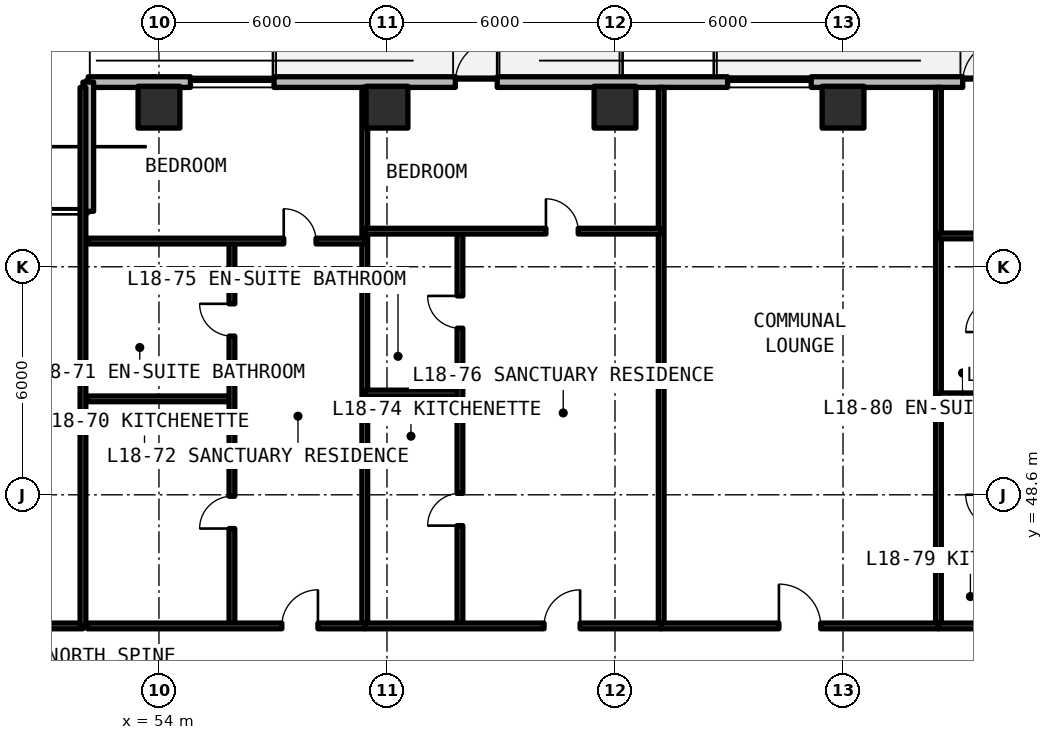
"""IFC4 building model, lengths in metres.
Left out: names, types, materials, properties, quantities, classifications, styles, units other than length and angle.
Written with IfcOpenShell. Run it as: python <this file> out.ifc"""

import sys

from ifc_helpers import new_model, si_unit, direction, frame, frame_2d, origin, origin_2d, place, context, subcontext, project, spatial, rectangle, extrude, element, fill, save


model = new_model("IFC4")
c1 = context("Model", 3, precision=1e-05, world=origin(), true_north=direction((0.0, 1.0)))
c2 = subcontext(c1, "Body", "Model", "MODEL_VIEW")
j1 = project(units=[si_unit("LENGTHUNIT", "METRE"), si_unit("PLANEANGLEUNIT", "RADIAN")], contexts=[c1])
p1 = place(None, origin())
s1 = spatial("IfcSite", under=j1, at=p1, CompositionType="ELEMENT")
p2 = place(p1, origin())
s2 = spatial("IfcBuilding", under=s1, at=p2, CompositionType="ELEMENT")
p3 = place(p2, frame((0.0, 0.0, 66.0)))
s3 = spatial("IfcBuildingStorey", under=s2, at=p3, CompositionType="ELEMENT", Elevation=66.0)
for number, where, z_axis, x_axis in (
    (1, (54.0, 58.8, 0.0), (0.0, 0.0, 1.0), (1.0, 0.0, 0.0)),
    (2, (60.0, 58.8, 0.0), (0.0, 0.0, 1.0), (1.0, 0.0, 0.0)),
    (3, (66.0, 58.8, 0.0), (0.0, 0.0, 1.0), (1.0, 0.0, 0.0)),
    (4, (72.0, 58.8, 0.0), (0.0, 0.0, 1.0), (1.0, 0.0, 0.0)),
):
    element("IfcColumn", number, at=place(p3, frame(where, z_axis=z_axis, x_axis=x_axis)), inside=s3, PredefinedType="COLUMN", context=c2, shape_type="SweptSolid", body=[
        extrude(rectangle(XDim=1.1, YDim=1.1, at=origin_2d()), origin(), (0.0, 0.0, 1.0), 3.63),
    ])
p4 = place(p3, frame((96.542, 59.46, 0.0), z_axis=(0.0, 0.0, 1.0), x_axis=(-1.0, 0.0, 0.0)))
e5 = element("IfcWall", 5, at=p4, inside=s3, PredefinedType="SOLIDWALL", context=c2, shape_type="SweptSolid", body=[
    extrude(rectangle(XDim=44.402, YDim=0.28, at=frame_2d((22.201, 0.0))), origin(), (0.0, 0.0, 1.0), 3.41),
])
p5 = place(p4, frame((33.642, 0.0, 0.0)))
e6 = element("IfcOpeningElement", 6, at=p5, cuts=e5, PredefinedType="OPENING", context=c2, shape_type="SweptSolid", body=[
    extrude(rectangle(XDim=1.1, YDim=2.15, at=frame_2d((0.55, 1.075))), frame((0.0, 0.15, 0.0), z_axis=(0.0, -1.0, 0.0), x_axis=(1.0, 0.0, 0.0)), (0.0, 0.0, 1.0), 0.3),
])
p6 = place(p4, frame((20.292, 0.0, 0.0)))
e7 = element("IfcOpeningElement", 7, at=p6, cuts=e5, PredefinedType="OPENING", context=c2, shape_type="SweptSolid", body=[
    extrude(rectangle(XDim=1.1, YDim=2.15, at=frame_2d((0.55, 1.075))), frame((0.0, 0.15, 0.0), z_axis=(0.0, -1.0, 0.0), x_axis=(1.0, 0.0, 0.0)), (0.0, 0.0, 1.0), 0.3),
])
p7 = place(p4, frame((9.692, 0.0, 0.0)))
e8 = element("IfcOpeningElement", 8, at=p7, cuts=e5, PredefinedType="OPENING", context=c2, shape_type="SweptSolid", body=[
    extrude(rectangle(XDim=1.1, YDim=2.15, at=frame_2d((0.55, 1.075))), frame((0.0, 0.15, 0.0), z_axis=(0.0, -1.0, 0.0), x_axis=(1.0, 0.0, 0.0)), (0.0, 0.0, 1.0), 0.3),
])
p8 = place(p4, frame((39.514, 0.0, 0.78)))
e9 = element("IfcOpeningElement", 9, at=p8, cuts=e5, PredefinedType="OPENING", context=c2, shape_type="SweptSolid", body=[
    extrude(rectangle(XDim=2.2, YDim=1.66, at=frame_2d((1.1, 0.83))), frame((0.0, 0.15, 0.0), z_axis=(0.0, -1.0, 0.0), x_axis=(1.0, 0.0, 0.0)), (0.0, 0.0, 1.0), 0.3),
])
p9 = place(p4, frame((25.379, 0.0, 0.78)))
e10 = element("IfcOpeningElement", 10, at=p9, cuts=e5, PredefinedType="OPENING", context=c2, shape_type="SweptSolid", body=[
    extrude(rectangle(XDim=2.2, YDim=1.66, at=frame_2d((1.1, 0.83))), frame((0.0, 0.15, 0.0), z_axis=(0.0, -1.0, 0.0), x_axis=(1.0, 0.0, 0.0)), (0.0, 0.0, 1.0), 0.3),
])
p10 = place(p4, frame((2.564, 0.0, 0.78)))
e11 = element("IfcOpeningElement", 11, at=p10, cuts=e5, PredefinedType="OPENING", context=c2, shape_type="SweptSolid", body=[
    extrude(rectangle(XDim=2.2, YDim=1.66, at=frame_2d((1.1, 0.83))), frame((0.0, 0.15, 0.0), z_axis=(0.0, -1.0, 0.0), x_axis=(1.0, 0.0, 0.0)), (0.0, 0.0, 1.0), 0.3),
])
p11 = place(p3, frame((52.14, 59.46, 0.0), z_axis=(0.0, 0.0, 1.0), x_axis=(0.0, -1.0, 0.0)))
e12 = element("IfcWall", 12, at=p11, inside=s3, PredefinedType="SOLIDWALL", context=c2, shape_type="SweptSolid", body=[
    extrude(rectangle(XDim=3.4, YDim=0.28, at=frame_2d((1.7, 0.0))), origin(), (0.0, 0.0, 1.0), 3.41),
])
p12 = place(p3, frame((43.6, 45.15, 0.0), z_axis=(0.0, 0.0, 1.0), x_axis=(1.0, 0.0, 0.0)))
e13 = element("IfcWall", 13, at=p12, inside=s3, PredefinedType="SOLIDWALL", context=c2, shape_type="SweptSolid", body=[
    extrude(rectangle(XDim=8.4, YDim=0.15, at=frame_2d((4.2, 0.0))), origin(), (0.0, 0.0, 1.0), 2.63),
])
p13 = place(p12, frame((3.65, 0.0, 0.0)))
e14 = element("IfcOpeningElement", 14, at=p13, cuts=e13, PredefinedType="OPENING", context=c2, shape_type="SweptSolid", body=[
    extrude(rectangle(XDim=1.1, YDim=2.15, at=frame_2d((0.55, 1.075))), frame((0.0, 0.085, 0.0), z_axis=(0.0, -1.0, 0.0), x_axis=(1.0, 0.0, 0.0)), (0.0, 0.0, 1.0), 0.17),
])
for number, where, z_axis, x_axis in (
    (15, (52.0, 45.15, 0.0), (0.0, 0.0, 1.0), (0.0, 1.0, 0.0)),
    (16, (59.416, 45.15, 0.0), (0.0, 0.0, 1.0), (0.0, 1.0, 0.0)),
):
    element("IfcWall", number, at=place(p3, frame(where, z_axis=z_axis, x_axis=x_axis)), inside=s3, PredefinedType="SOLIDWALL", context=c2, shape_type="SweptSolid", body=[
        extrude(rectangle(XDim=14.17, YDim=0.15, at=frame_2d((7.085, 0.0))), origin(), (0.0, 0.0, 1.0), 2.63),
    ])
p14 = place(p3, frame((52.12, 51.125, 0.0), z_axis=(0.0, 0.0, 1.0), x_axis=(1.0, 0.0, 0.0)))
e17 = element("IfcWall", 17, at=p14, inside=s3, PredefinedType="PARTITIONING", context=c2, shape_type="SweptSolid", body=[
    extrude(rectangle(XDim=3.8, YDim=0.15, at=frame_2d((1.9, 0.0))), origin(), (0.0, 0.0, 1.0), 2.63),
])
p15 = place(p3, frame((55.92, 45.15, 0.0), z_axis=(0.0, 0.0, 1.0), x_axis=(0.0, 1.0, 0.0)))
e18 = element("IfcWall", 18, at=p15, inside=s3, PredefinedType="PARTITIONING", context=c2, shape_type="SweptSolid", body=[
    extrude(rectangle(XDim=10.127, YDim=0.15, at=frame_2d((5.063, 0.0))), origin(), (0.0, 0.0, 1.0), 2.63),
])
p16 = place(p15, frame((2.562, 0.0, 0.0)))
e19 = element("IfcOpeningElement", 19, at=p16, cuts=e18, PredefinedType="OPENING", context=c2, shape_type="SweptSolid", body=[
    extrude(rectangle(XDim=0.85, YDim=2.1, at=frame_2d((0.425, 1.05))), frame((0.0, 0.085, 0.0), z_axis=(0.0, -1.0, 0.0), x_axis=(1.0, 0.0, 0.0)), (0.0, 0.0, 1.0), 0.17),
])
p17 = place(p15, frame((7.626, 0.0, 0.0)))
e20 = element("IfcOpeningElement", 20, at=p17, cuts=e18, PredefinedType="OPENING", context=c2, shape_type="SweptSolid", body=[
    extrude(rectangle(XDim=0.85, YDim=2.1, at=frame_2d((0.425, 1.05))), frame((0.0, 0.085, 0.0), z_axis=(0.0, -1.0, 0.0), x_axis=(1.0, 0.0, 0.0)), (0.0, 0.0, 1.0), 0.17),
])
p18 = place(p3, frame((52.12, 55.277, 0.0), z_axis=(0.0, 0.0, 1.0), x_axis=(1.0, 0.0, 0.0)))
e21 = element("IfcWall", 21, at=p18, inside=s3, PredefinedType="PARTITIONING", context=c2, shape_type="SweptSolid", body=[
    extrude(rectangle(XDim=7.296, YDim=0.15, at=frame_2d((3.648, 0.0))), origin(), (0.0, 0.0, 1.0), 2.63),
])
p19 = place(p18, frame((5.163, 0.0, 0.0)))
e22 = element("IfcOpeningElement", 22, at=p19, cuts=e21, PredefinedType="OPENING", context=c2, shape_type="SweptSolid", body=[
    extrude(rectangle(XDim=0.85, YDim=2.1, at=frame_2d((0.425, 1.05))), frame((0.0, 0.085, 0.0), z_axis=(0.0, -1.0, 0.0), x_axis=(1.0, 0.0, 0.0)), (0.0, 0.0, 1.0), 0.17),
])
p20 = place(p3, frame((52.12, 45.15, 0.0), z_axis=(0.0, 0.0, 1.0), x_axis=(1.0, 0.0, 0.0)))
e23 = element("IfcWall", 23, at=p20, inside=s3, PredefinedType="SOLIDWALL", context=c2, shape_type="SweptSolid", body=[
    extrude(rectangle(XDim=7.296, YDim=0.15, at=frame_2d((3.648, 0.0))), origin(), (0.0, 0.0, 1.0), 2.63),
])
p21 = place(p20, frame((5.113, 0.0, 0.0)))
e24 = element("IfcOpeningElement", 24, at=p21, cuts=e23, PredefinedType="OPENING", context=c2, shape_type="SweptSolid", body=[
    extrude(rectangle(XDim=0.95, YDim=2.15, at=frame_2d((0.475, 1.075))), frame((0.0, 0.085, 0.0), z_axis=(0.0, -1.0, 0.0), x_axis=(1.0, 0.0, 0.0)), (0.0, 0.0, 1.0), 0.17),
])
p22 = place(p3, frame((67.215, 45.15, 0.0), z_axis=(0.0, 0.0, 1.0), x_axis=(0.0, 1.0, 0.0)))
e25 = element("IfcWall", 25, at=p22, inside=s3, PredefinedType="SOLIDWALL", context=c2, shape_type="SweptSolid", body=[
    extrude(rectangle(XDim=14.17, YDim=0.15, at=frame_2d((7.085, 0.0))), origin(), (0.0, 0.0, 1.0), 2.63),
])
p23 = place(p3, frame((59.416, 51.279, 0.0), z_axis=(0.0, 0.0, 1.0), x_axis=(1.0, 0.0, 0.0)))
e26 = element("IfcWall", 26, at=p23, inside=s3, PredefinedType="PARTITIONING", context=c2, shape_type="SweptSolid", body=[
    extrude(rectangle(XDim=2.504, YDim=0.15, at=frame_2d((1.252, 0.0))), origin(), (0.0, 0.0, 1.0), 2.63),
])
p24 = place(p3, frame((61.92, 45.15, 0.0), z_axis=(0.0, 0.0, 1.0), x_axis=(0.0, 1.0, 0.0)))
e27 = element("IfcWall", 27, at=p24, inside=s3, PredefinedType="PARTITIONING", context=c2, shape_type="SweptSolid", body=[
    extrude(rectangle(XDim=10.388, YDim=0.15, at=frame_2d((5.194, 0.0))), origin(), (0.0, 0.0, 1.0), 2.63),
])
p25 = place(p24, frame((2.639, 0.0, 0.0)))
e28 = element("IfcOpeningElement", 28, at=p25, cuts=e27, PredefinedType="OPENING", context=c2, shape_type="SweptSolid", body=[
    extrude(rectangle(XDim=0.85, YDim=2.1, at=frame_2d((0.425, 1.05))), frame((0.0, 0.085, 0.0), z_axis=(0.0, -1.0, 0.0), x_axis=(1.0, 0.0, 0.0)), (0.0, 0.0, 1.0), 0.17),
])
p26 = place(p24, frame((7.833, 0.0, 0.0)))
e29 = element("IfcOpeningElement", 29, at=p26, cuts=e27, PredefinedType="OPENING", context=c2, shape_type="SweptSolid", body=[
    extrude(rectangle(XDim=0.85, YDim=2.1, at=frame_2d((0.425, 1.05))), frame((0.0, 0.085, 0.0), z_axis=(0.0, -1.0, 0.0), x_axis=(1.0, 0.0, 0.0)), (0.0, 0.0, 1.0), 0.17),
])
p27 = place(p3, frame((59.416, 55.538, 0.0), z_axis=(0.0, 0.0, 1.0), x_axis=(1.0, 0.0, 0.0)))
e30 = element("IfcWall", 30, at=p27, inside=s3, PredefinedType="PARTITIONING", context=c2, shape_type="SweptSolid", body=[
    extrude(rectangle(XDim=7.799, YDim=0.15, at=frame_2d((3.9, 0.0))), origin(), (0.0, 0.0, 1.0), 2.63),
])
p28 = place(p27, frame((4.767, 0.0, 0.0)))
e31 = element("IfcOpeningElement", 31, at=p28, cuts=e30, PredefinedType="OPENING", context=c2, shape_type="SweptSolid", body=[
    extrude(rectangle(XDim=0.85, YDim=2.1, at=frame_2d((0.425, 1.05))), frame((0.0, 0.085, 0.0), z_axis=(0.0, -1.0, 0.0), x_axis=(1.0, 0.0, 0.0)), (0.0, 0.0, 1.0), 0.17),
])
p29 = place(p3, frame((59.416, 45.15, 0.0), z_axis=(0.0, 0.0, 1.0), x_axis=(1.0, 0.0, 0.0)))
e32 = element("IfcWall", 32, at=p29, inside=s3, PredefinedType="SOLIDWALL", context=c2, shape_type="SweptSolid", body=[
    extrude(rectangle(XDim=7.799, YDim=0.15, at=frame_2d((3.9, 0.0))), origin(), (0.0, 0.0, 1.0), 2.63),
])
p30 = place(p29, frame((4.717, 0.0, 0.0)))
e33 = element("IfcOpeningElement", 33, at=p30, cuts=e32, PredefinedType="OPENING", context=c2, shape_type="SweptSolid", body=[
    extrude(rectangle(XDim=0.95, YDim=2.15, at=frame_2d((0.475, 1.075))), frame((0.0, 0.085, 0.0), z_axis=(0.0, -1.0, 0.0), x_axis=(1.0, 0.0, 0.0)), (0.0, 0.0, 1.0), 0.17),
])
p31 = place(p3, frame((74.511, 45.15, 0.0), z_axis=(0.0, 0.0, 1.0), x_axis=(0.0, 1.0, 0.0)))
e34 = element("IfcWall", 34, at=p31, inside=s3, PredefinedType="SOLIDWALL", context=c2, shape_type="SweptSolid", body=[
    extrude(rectangle(XDim=14.17, YDim=0.15, at=frame_2d((7.085, 0.0))), origin(), (0.0, 0.0, 1.0), 2.63),
])
p32 = place(p3, frame((67.215, 45.15, 0.0), z_axis=(0.0, 0.0, 1.0), x_axis=(1.0, 0.0, 0.0)))
e35 = element("IfcWall", 35, at=p32, inside=s3, PredefinedType="SOLIDWALL", context=c2, shape_type="SweptSolid", body=[
    extrude(rectangle(XDim=7.296, YDim=0.15, at=frame_2d((3.648, 0.0))), origin(), (0.0, 0.0, 1.0), 2.63),
])
p33 = place(p32, frame((3.098, 0.0, 0.0)))
e36 = element("IfcOpeningElement", 36, at=p33, cuts=e35, PredefinedType="OPENING", context=c2, shape_type="SweptSolid", body=[
    extrude(rectangle(XDim=1.1, YDim=2.15, at=frame_2d((0.55, 1.075))), frame((0.0, 0.085, 0.0), z_axis=(0.0, -1.0, 0.0), x_axis=(1.0, 0.0, 0.0)), (0.0, 0.0, 1.0), 0.17),
])
p34 = place(p3, frame((74.511, 51.204, 0.0), z_axis=(0.0, 0.0, 1.0), x_axis=(1.0, 0.0, 0.0)))
e37 = element("IfcWall", 37, at=p34, inside=s3, PredefinedType="PARTITIONING", context=c2, shape_type="SweptSolid", body=[
    extrude(rectangle(XDim=1.569, YDim=0.15, at=frame_2d((0.784, 0.0))), origin(), (0.0, 0.0, 1.0), 2.63),
])
p35 = place(p3, frame((74.511, 55.412, 0.0), z_axis=(0.0, 0.0, 1.0), x_axis=(1.0, 0.0, 0.0)))
e38 = element("IfcWall", 38, at=p35, inside=s3, PredefinedType="PARTITIONING", context=c2, shape_type="SweptSolid", body=[
    extrude(rectangle(XDim=7.548, YDim=0.15, at=frame_2d((3.774, 0.0))), origin(), (0.0, 0.0, 1.0), 2.63),
])
p36 = place(p35, frame((4.173, 0.0, 0.0)))
e39 = element("IfcOpeningElement", 39, at=p36, cuts=e38, PredefinedType="OPENING", context=c2, shape_type="SweptSolid", body=[
    extrude(rectangle(XDim=0.85, YDim=2.1, at=frame_2d((0.425, 1.05))), frame((0.0, 0.085, 0.0), z_axis=(0.0, -1.0, 0.0), x_axis=(1.0, 0.0, 0.0)), (0.0, 0.0, 1.0), 0.17),
])
p37 = place(p3, frame((74.511, 45.15, 0.0), z_axis=(0.0, 0.0, 1.0), x_axis=(1.0, 0.0, 0.0)))
e40 = element("IfcWall", 40, at=p37, inside=s3, PredefinedType="SOLIDWALL", context=c2, shape_type="SweptSolid", body=[
    extrude(rectangle(XDim=7.548, YDim=0.15, at=frame_2d((3.774, 0.0))), origin(), (0.0, 0.0, 1.0), 2.63),
])
p38 = place(p37, frame((4.123, 0.0, 0.0)))
e41 = element("IfcOpeningElement", 41, at=p38, cuts=e40, PredefinedType="OPENING", context=c2, shape_type="SweptSolid", body=[
    extrude(rectangle(XDim=0.95, YDim=2.15, at=frame_2d((0.475, 1.075))), frame((0.0, 0.085, 0.0), z_axis=(0.0, -1.0, 0.0), x_axis=(1.0, 0.0, 0.0)), (0.0, 0.0, 1.0), 0.17),
])
p39 = place(p5, frame((1.1, 0.0, 0.0), z_axis=(0.0, 0.0, 1.0), x_axis=(-1.0, 0.0, 0.0)))
e42 = element("IfcDoor", 42, at=p39, inside=s3, OperationType="SINGLE_SWING_LEFT", PredefinedType="DOOR", context=c2, shape_type="SweptSolid", body=[
    extrude(rectangle(XDim=1.1, YDim=2.15, at=frame_2d((0.55, 1.075))), frame((0.0, 0.025, 0.0), z_axis=(0.0, -1.0, 0.0), x_axis=(1.0, 0.0, 0.0)), (0.0, 0.0, 1.0), 0.05),
])
fill(e6, e42)
p40 = place(p6, frame((1.1, 0.0, 0.0), z_axis=(0.0, 0.0, 1.0), x_axis=(-1.0, 0.0, 0.0)))
e43 = element("IfcDoor", 43, at=p40, inside=s3, OperationType="SINGLE_SWING_RIGHT", PredefinedType="DOOR", context=c2, shape_type="SweptSolid", body=[
    extrude(rectangle(XDim=1.1, YDim=2.15, at=frame_2d((0.55, 1.075))), frame((0.0, 0.025, 0.0), z_axis=(0.0, -1.0, 0.0), x_axis=(1.0, 0.0, 0.0)), (0.0, 0.0, 1.0), 0.05),
])
fill(e7, e43)
p41 = place(p8, origin())
e44 = element("IfcWindow", 44, at=p41, inside=s3, PartitioningType="SINGLE_PANEL", PredefinedType="WINDOW", context=c2, shape_type="SweptSolid", body=[
    extrude(rectangle(XDim=2.2, YDim=1.66, at=frame_2d((1.1, 0.83))), frame((0.0, 0.03, 0.0), z_axis=(0.0, -1.0, 0.0), x_axis=(1.0, 0.0, 0.0)), (0.0, 0.0, 1.0), 0.06),
])
fill(e9, e44)
p42 = place(p9, origin())
e45 = element("IfcWindow", 45, at=p42, inside=s3, PartitioningType="SINGLE_PANEL", PredefinedType="WINDOW", context=c2, shape_type="SweptSolid", body=[
    extrude(rectangle(XDim=2.2, YDim=1.66, at=frame_2d((1.1, 0.83))), frame((0.0, 0.03, 0.0), z_axis=(0.0, -1.0, 0.0), x_axis=(1.0, 0.0, 0.0)), (0.0, 0.0, 1.0), 0.06),
])
fill(e10, e45)
p43 = place(p16, origin())
e46 = element("IfcDoor", 46, at=p43, inside=s3, OperationType="SINGLE_SWING_LEFT", PredefinedType="DOOR", context=c2, shape_type="SweptSolid", body=[
    extrude(rectangle(XDim=0.85, YDim=2.1, at=frame_2d((0.425, 1.05))), frame((0.0, 0.025, 0.0), z_axis=(0.0, -1.0, 0.0), x_axis=(1.0, 0.0, 0.0)), (0.0, 0.0, 1.0), 0.05),
])
fill(e19, e46)
p44 = place(p17, origin())
e47 = element("IfcDoor", 47, at=p44, inside=s3, OperationType="SINGLE_SWING_RIGHT", PredefinedType="DOOR", context=c2, shape_type="SweptSolid", body=[
    extrude(rectangle(XDim=0.85, YDim=2.1, at=frame_2d((0.425, 1.05))), frame((0.0, 0.025, 0.0), z_axis=(0.0, -1.0, 0.0), x_axis=(1.0, 0.0, 0.0)), (0.0, 0.0, 1.0), 0.05),
])
fill(e20, e47)
p45 = place(p19, origin())
e48 = element("IfcDoor", 48, at=p45, inside=s3, OperationType="SINGLE_SWING_LEFT", PredefinedType="DOOR", context=c2, shape_type="SweptSolid", body=[
    extrude(rectangle(XDim=0.85, YDim=2.1, at=frame_2d((0.425, 1.05))), frame((0.0, 0.025, 0.0), z_axis=(0.0, -1.0, 0.0), x_axis=(1.0, 0.0, 0.0)), (0.0, 0.0, 1.0), 0.05),
])
fill(e22, e48)
p46 = place(p21, origin())
e49 = element("IfcDoor", 49, at=p46, inside=s3, OperationType="SINGLE_SWING_RIGHT", PredefinedType="DOOR", context=c2, shape_type="SweptSolid", body=[
    extrude(rectangle(XDim=0.95, YDim=2.15, at=frame_2d((0.475, 1.075))), frame((0.0, 0.025, 0.0), z_axis=(0.0, -1.0, 0.0), x_axis=(1.0, 0.0, 0.0)), (0.0, 0.0, 1.0), 0.05),
])
fill(e24, e49)
p47 = place(p25, origin())
e50 = element("IfcDoor", 50, at=p47, inside=s3, OperationType="SINGLE_SWING_LEFT", PredefinedType="DOOR", context=c2, shape_type="SweptSolid", body=[
    extrude(rectangle(XDim=0.85, YDim=2.1, at=frame_2d((0.425, 1.05))), frame((0.0, 0.025, 0.0), z_axis=(0.0, -1.0, 0.0), x_axis=(1.0, 0.0, 0.0)), (0.0, 0.0, 1.0), 0.05),
])
fill(e28, e50)
p48 = place(p26, origin())
e51 = element("IfcDoor", 51, at=p48, inside=s3, OperationType="SINGLE_SWING_RIGHT", PredefinedType="DOOR", context=c2, shape_type="SweptSolid", body=[
    extrude(rectangle(XDim=0.85, YDim=2.1, at=frame_2d((0.425, 1.05))), frame((0.0, 0.025, 0.0), z_axis=(0.0, -1.0, 0.0), x_axis=(1.0, 0.0, 0.0)), (0.0, 0.0, 1.0), 0.05),
])
fill(e29, e51)
p49 = place(p28, origin())
e52 = element("IfcDoor", 52, at=p49, inside=s3, OperationType="SINGLE_SWING_LEFT", PredefinedType="DOOR", context=c2, shape_type="SweptSolid", body=[
    extrude(rectangle(XDim=0.85, YDim=2.1, at=frame_2d((0.425, 1.05))), frame((0.0, 0.025, 0.0), z_axis=(0.0, -1.0, 0.0), x_axis=(1.0, 0.0, 0.0)), (0.0, 0.0, 1.0), 0.05),
])
fill(e31, e52)
p50 = place(p30, origin())
e53 = element("IfcDoor", 53, at=p50, inside=s3, OperationType="SINGLE_SWING_RIGHT", PredefinedType="DOOR", context=c2, shape_type="SweptSolid", body=[
    extrude(rectangle(XDim=0.95, YDim=2.15, at=frame_2d((0.475, 1.075))), frame((0.0, 0.025, 0.0), z_axis=(0.0, -1.0, 0.0), x_axis=(1.0, 0.0, 0.0)), (0.0, 0.0, 1.0), 0.05),
])
fill(e33, e53)
p51 = place(p33, origin())
e54 = element("IfcDoor", 54, at=p51, inside=s3, OperationType="SINGLE_SWING_LEFT", PredefinedType="DOOR", context=c2, shape_type="SweptSolid", body=[
    extrude(rectangle(XDim=1.1, YDim=2.15, at=frame_2d((0.55, 1.075))), frame((0.0, 0.025, 0.0), z_axis=(0.0, -1.0, 0.0), x_axis=(1.0, 0.0, 0.0)), (0.0, 0.0, 1.0), 0.05),
])
fill(e36, e54)
save(model, sys.argv[1])
